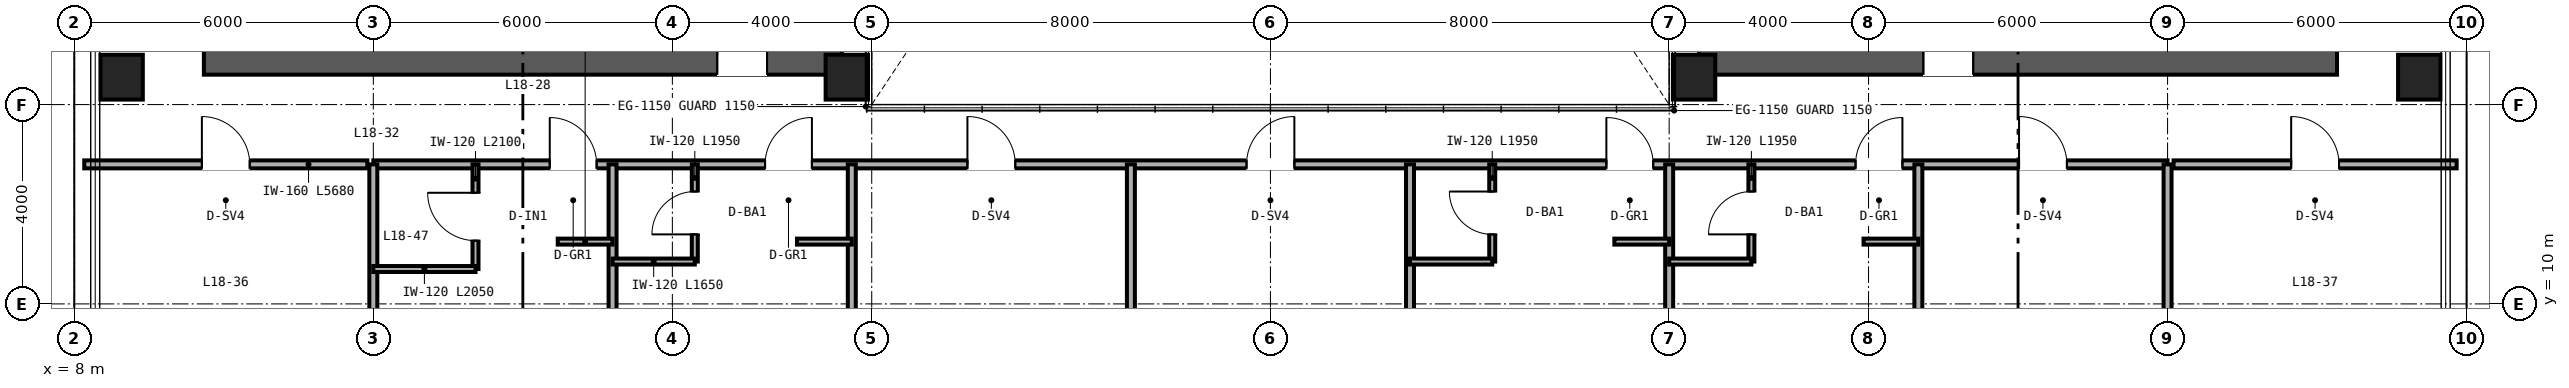
"""IFC4 building model, lengths in metres.
Left out: names, types, materials, properties, quantities, classifications, styles, units other than length and angle.
Written with IfcOpenShell. Run it as: python <this file> out.ifc"""

import sys

from ifc_helpers import new_model, si_unit, direction, frame, frame_2d, origin, origin_2d, place, context, subcontext, project, spatial, rectangle, hollow_rectangle, extrude, source, transform, mapped, element, fill, save


model = new_model("IFC4")
c1 = context("Model", 3, precision=1e-05, world=origin(), true_north=direction((0.0, 1.0)))
c2 = subcontext(c1, "Body", "Model", "MODEL_VIEW")
j1 = project(units=[si_unit("LENGTHUNIT", "METRE"), si_unit("PLANEANGLEUNIT", "RADIAN")], contexts=[c1])
p1 = place(None, origin())
s1 = spatial("IfcSite", under=j1, at=p1, CompositionType="ELEMENT")
p2 = place(p1, origin())
s2 = spatial("IfcBuilding", under=s1, at=p2, CompositionType="ELEMENT")
p3 = place(p2, frame((0.0, 0.0, 74.4)))
s3 = spatial("IfcBuildingStorey", under=s2, at=p3, CompositionType="ELEMENT", Elevation=74.4)
p4 = place(p3, frame((10.6, 15.0, 0.0), z_axis=(0.0, 0.0, 1.0), x_axis=(1.0, 0.0, 0.0)))
e1 = element("IfcWall", 1, at=p4, inside=s3, PredefinedType="SHEAR", context=c2, shape_type="SweptSolid", body=[
    extrude(rectangle(XDim=12.8, YDim=0.8, at=frame_2d((6.4, 0.0))), origin(), (0.0, 0.0, 1.0), 3.35),
])
p5 = place(p4, frame((10.3, 0.0, 0.0)))
e2 = element("IfcOpeningElement", 2, at=p5, cuts=e1, PredefinedType="OPENING", context=c2, shape_type="SweptSolid", body=[
    extrude(rectangle(XDim=1.0, YDim=2.15, at=frame_2d((0.5, 1.075))), frame((0.0, 0.41, 0.0), z_axis=(0.0, -1.0, 0.0), x_axis=(1.0, 0.0, 0.0)), (0.0, 0.0, 1.0), 0.82),
])
p6 = place(p3, frame((40.6, 15.0, 0.0), z_axis=(0.0, 0.0, 1.0), x_axis=(1.0, 0.0, 0.0)))
e3 = element("IfcWall", 3, at=p6, inside=s3, PredefinedType="SHEAR", context=c2, shape_type="SweptSolid", body=[
    extrude(rectangle(XDim=12.8, YDim=0.8, at=frame_2d((6.4, 0.0))), origin(), (0.0, 0.0, 1.0), 3.35),
])
p7 = place(p6, frame((4.5, 0.0, 0.0)))
e4 = element("IfcOpeningElement", 4, at=p7, cuts=e3, PredefinedType="OPENING", context=c2, shape_type="SweptSolid", body=[
    extrude(rectangle(XDim=1.0, YDim=2.15, at=frame_2d((0.5, 1.075))), frame((0.0, 0.41, 0.0), z_axis=(0.0, -1.0, 0.0), x_axis=(1.0, 0.0, 0.0)), (0.0, 0.0, 1.0), 0.82),
])
m1 = source(origin(), c2, "Body", "SweptSolid", [
    extrude(hollow_rectangle(XDim=0.85, YDim=0.9, WallThickness=0.04, at=origin_2d()), origin(), (0.0, 0.0, 1.0), 3.35),
])
for number, where, z_axis, x_axis in (
    (5, (8.95, 14.55, 0.0), (0.0, 0.0, 1.0), (1.0, 0.0, 0.0)),
    (6, (23.5, 14.55, 0.0), (0.0, 0.0, 1.0), (1.0, 0.0, 0.0)),
    (7, (40.5, 14.55, 0.0), (0.0, 0.0, 1.0), (1.0, 0.0, 0.0)),
    (8, (55.05, 14.55, 0.0), (0.0, 0.0, 1.0), (1.0, 0.0, 0.0)),
):
    element("IfcColumn", number, at=place(p3, frame(where, z_axis=z_axis, x_axis=x_axis)), inside=s3, PredefinedType="COLUMN", context=c2, shape_type="MappedRepresentation", body=[
        mapped(m1, transform((0.0, 0.0, 0.0), scale=1.0)),
    ])
p8 = place(p3, frame((8.2, 12.8, 0.0), z_axis=(0.0, 0.0, 1.0), x_axis=(1.0, 0.0, 0.0)))
e9 = element("IfcWall", 9, at=p8, inside=s3, PredefinedType="PARTITIONING", context=c2, shape_type="SweptSolid", body=[
    extrude(rectangle(XDim=5.68, YDim=0.16, at=frame_2d((2.84, 0.0))), origin(), (0.0, 0.0, 1.0), 3.35),
])
p9 = place(p8, frame((2.36, 0.0, 0.0)))
e10 = element("IfcOpeningElement", 10, at=p9, cuts=e9, PredefinedType="OPENING", context=c2, shape_type="SweptSolid", body=[
    extrude(rectangle(XDim=0.96, YDim=2.15, at=frame_2d((0.48, 1.075))), frame((0.0, 0.09, 0.0), z_axis=(0.0, -1.0, 0.0), x_axis=(1.0, 0.0, 0.0)), (0.0, 0.0, 1.0), 0.18),
])
p10 = place(p3, frame((50.12, 12.8, 0.0), z_axis=(0.0, 0.0, 1.0), x_axis=(1.0, 0.0, 0.0)))
e11 = element("IfcWall", 11, at=p10, inside=s3, PredefinedType="PARTITIONING", context=c2, shape_type="SweptSolid", body=[
    extrude(rectangle(XDim=5.68, YDim=0.16, at=frame_2d((2.84, 0.0))), origin(), (0.0, 0.0, 1.0), 3.35),
])
p11 = place(p10, frame((2.36, 0.0, 0.0)))
e12 = element("IfcOpeningElement", 12, at=p11, cuts=e11, PredefinedType="OPENING", context=c2, shape_type="SweptSolid", body=[
    extrude(rectangle(XDim=0.96, YDim=2.15, at=frame_2d((0.48, 1.075))), frame((0.0, 0.09, 0.0), z_axis=(0.0, -1.0, 0.0), x_axis=(1.0, 0.0, 0.0)), (0.0, 0.0, 1.0), 0.18),
])
p12 = place(p3, frame((14.0, 12.8, 0.0), z_axis=(0.0, 0.0, 1.0), x_axis=(1.0, 0.0, 0.0)))
e13 = element("IfcWall", 13, at=p12, inside=s3, PredefinedType="PARTITIONING", context=c2, shape_type="SweptSolid", body=[
    extrude(rectangle(XDim=36.0, YDim=0.16, at=frame_2d((18.0, 0.0))), origin(), (0.0, 0.0, 1.0), 2.571),
])
p13 = place(p12, frame((3.54, 0.0, 0.0)))
e14 = element("IfcOpeningElement", 14, at=p13, cuts=e13, PredefinedType="OPENING", context=c2, shape_type="SweptSolid", body=[
    extrude(rectangle(XDim=0.94, YDim=2.15, at=frame_2d((0.47, 1.075))), frame((0.0, 0.09, 0.0), z_axis=(0.0, -1.0, 0.0), x_axis=(1.0, 0.0, 0.0)), (0.0, 0.0, 1.0), 0.18),
])
p14 = place(p12, frame((7.86, 0.0, 0.0)))
e15 = element("IfcOpeningElement", 15, at=p14, cuts=e13, PredefinedType="OPENING", context=c2, shape_type="SweptSolid", body=[
    extrude(rectangle(XDim=0.94, YDim=2.15, at=frame_2d((0.47, 1.075))), frame((0.0, 0.09, 0.0), z_axis=(0.0, -1.0, 0.0), x_axis=(1.0, 0.0, 0.0)), (0.0, 0.0, 1.0), 0.18),
])
p15 = place(p12, frame((11.92, 0.0, 0.0)))
e16 = element("IfcOpeningElement", 16, at=p15, cuts=e13, PredefinedType="OPENING", context=c2, shape_type="SweptSolid", body=[
    extrude(rectangle(XDim=0.96, YDim=2.15, at=frame_2d((0.48, 1.075))), frame((0.0, 0.09, 0.0), z_axis=(0.0, -1.0, 0.0), x_axis=(1.0, 0.0, 0.0)), (0.0, 0.0, 1.0), 0.18),
])
p16 = place(p12, frame((17.52, 0.0, 0.0)))
e17 = element("IfcOpeningElement", 17, at=p16, cuts=e13, PredefinedType="OPENING", context=c2, shape_type="SweptSolid", body=[
    extrude(rectangle(XDim=0.96, YDim=2.15, at=frame_2d((0.48, 1.075))), frame((0.0, 0.09, 0.0), z_axis=(0.0, -1.0, 0.0), x_axis=(1.0, 0.0, 0.0)), (0.0, 0.0, 1.0), 0.18),
])
p17 = place(p12, frame((24.74, 0.0, 0.0)))
e18 = element("IfcOpeningElement", 18, at=p17, cuts=e13, PredefinedType="OPENING", context=c2, shape_type="SweptSolid", body=[
    extrude(rectangle(XDim=0.94, YDim=2.15, at=frame_2d((0.47, 1.075))), frame((0.0, 0.09, 0.0), z_axis=(0.0, -1.0, 0.0), x_axis=(1.0, 0.0, 0.0)), (0.0, 0.0, 1.0), 0.18),
])
p18 = place(p12, frame((29.74, 0.0, 0.0)))
e19 = element("IfcOpeningElement", 19, at=p18, cuts=e13, PredefinedType="OPENING", context=c2, shape_type="SweptSolid", body=[
    extrude(rectangle(XDim=0.94, YDim=2.15, at=frame_2d((0.47, 1.075))), frame((0.0, 0.09, 0.0), z_axis=(0.0, -1.0, 0.0), x_axis=(1.0, 0.0, 0.0)), (0.0, 0.0, 1.0), 0.18),
])
p19 = place(p12, frame((33.02, 0.0, 0.0)))
e20 = element("IfcOpeningElement", 20, at=p19, cuts=e13, PredefinedType="OPENING", context=c2, shape_type="SweptSolid", body=[
    extrude(rectangle(XDim=0.96, YDim=2.15, at=frame_2d((0.48, 1.075))), frame((0.0, 0.09, 0.0), z_axis=(0.0, -1.0, 0.0), x_axis=(1.0, 0.0, 0.0)), (0.0, 0.0, 1.0), 0.18),
])
for number, where, z_axis, x_axis in (
    (21, (14.0, 2.36, 0.0), (0.0, 0.0, 1.0), (0.0, 1.0, 0.0)),
    (22, (50.0, 2.36, 0.0), (0.0, 0.0, 1.0), (0.0, 1.0, 0.0)),
    (23, (18.8, 2.36, 0.0), (0.0, 0.0, 1.0), (0.0, 1.0, 0.0)),
):
    element("IfcWall", number, at=place(p3, frame(where, z_axis=z_axis, x_axis=x_axis)), inside=s3, PredefinedType="PARTITIONING", context=c2, shape_type="SweptSolid", body=[
        extrude(rectangle(XDim=10.44, YDim=0.16, at=frame_2d((5.22, 0.0))), origin(), (0.0, 0.0, 1.0), 2.657),
    ])
p20 = place(p3, frame((16.05, 10.7, 0.0), z_axis=(0.0, 0.0, 1.0), x_axis=(0.0, 1.0, 0.0)))
e24 = element("IfcWall", 24, at=p20, inside=s3, PredefinedType="PARTITIONING", context=c2, shape_type="SweptSolid", body=[
    extrude(rectangle(XDim=2.1, YDim=0.12, at=frame_2d((1.05, 0.0))), origin(), (0.0, 0.0, 1.0), 3.35),
])
p21 = place(p20, frame((0.57, 0.0, 0.0)))
e25 = element("IfcOpeningElement", 25, at=p21, cuts=e24, PredefinedType="OPENING", context=c2, shape_type="SweptSolid", body=[
    extrude(rectangle(XDim=0.96, YDim=2.15, at=frame_2d((0.48, 1.075))), frame((0.0, 0.07, 0.0), z_axis=(0.0, -1.0, 0.0), x_axis=(1.0, 0.0, 0.0)), (0.0, 0.0, 1.0), 0.14),
])
p22 = place(p3, frame((14.0, 10.7, 0.0), z_axis=(0.0, 0.0, 1.0), x_axis=(1.0, 0.0, 0.0)))
e26 = element("IfcWall", 26, at=p22, inside=s3, PredefinedType="PARTITIONING", context=c2, shape_type="SweptSolid", body=[
    extrude(rectangle(XDim=2.05, YDim=0.12, at=frame_2d((1.025, 0.0))), origin(), (0.0, 0.0, 1.0), 3.35),
])
p23 = place(p3, frame((17.7, 11.25, 0.0), z_axis=(0.0, 0.0, 1.0), x_axis=(1.0, 0.0, 0.0)))
e27 = element("IfcWall", 27, at=p23, inside=s3, PredefinedType="PARTITIONING", context=c2, shape_type="SweptSolid", body=[
    extrude(rectangle(XDim=1.1, YDim=0.12, at=frame_2d((0.55, 0.0))), origin(), (0.0, 0.0, 1.0), 3.35),
])
p24 = place(p3, frame((23.6, 2.36, 0.0), z_axis=(0.0, 0.0, 1.0), x_axis=(0.0, 1.0, 0.0)))
e28 = element("IfcWall", 28, at=p24, inside=s3, PredefinedType="PARTITIONING", context=c2, shape_type="SweptSolid", body=[
    extrude(rectangle(XDim=10.44, YDim=0.16, at=frame_2d((5.22, 0.0))), origin(), (0.0, 0.0, 1.0), 2.423),
])
p25 = place(p3, frame((20.45, 10.85, 0.0), z_axis=(0.0, 0.0, 1.0), x_axis=(0.0, 1.0, 0.0)))
e29 = element("IfcWall", 29, at=p25, inside=s3, PredefinedType="PARTITIONING", context=c2, shape_type="SweptSolid", body=[
    extrude(rectangle(XDim=1.95, YDim=0.12, at=frame_2d((0.975, 0.0))), origin(), (0.0, 0.0, 1.0), 3.35),
])
p26 = place(p25, frame((0.545, 0.0, 0.0)))
e30 = element("IfcOpeningElement", 30, at=p26, cuts=e29, PredefinedType="OPENING", context=c2, shape_type="SweptSolid", body=[
    extrude(rectangle(XDim=0.86, YDim=2.1, at=frame_2d((0.43, 1.05))), frame((0.0, 0.07, 0.0), z_axis=(0.0, -1.0, 0.0), x_axis=(1.0, 0.0, 0.0)), (0.0, 0.0, 1.0), 0.14),
])
p27 = place(p3, frame((18.8, 10.85, 0.0), z_axis=(0.0, 0.0, 1.0), x_axis=(1.0, 0.0, 0.0)))
e31 = element("IfcWall", 31, at=p27, inside=s3, PredefinedType="PARTITIONING", context=c2, shape_type="SweptSolid", body=[
    extrude(rectangle(XDim=1.65, YDim=0.12, at=frame_2d((0.825, 0.0))), origin(), (0.0, 0.0, 1.0), 3.35),
])
p28 = place(p3, frame((22.5, 11.25, 0.0), z_axis=(0.0, 0.0, 1.0), x_axis=(1.0, 0.0, 0.0)))
e32 = element("IfcWall", 32, at=p28, inside=s3, PredefinedType="PARTITIONING", context=c2, shape_type="SweptSolid", body=[
    extrude(rectangle(XDim=1.1, YDim=0.12, at=frame_2d((0.55, 0.0))), origin(), (0.0, 0.0, 1.0), 2.571),
])
for number, where, z_axis, x_axis in (
    (33, (29.2, 2.36, 0.0), (0.0, 0.0, 1.0), (0.0, 1.0, 0.0)),
    (34, (34.8, 2.36, 0.0), (0.0, 0.0, 1.0), (0.0, 1.0, 0.0)),
    (35, (40.0, 2.36, 0.0), (0.0, 0.0, 1.0), (0.0, 1.0, 0.0)),
):
    element("IfcWall", number, at=place(p3, frame(where, z_axis=z_axis, x_axis=x_axis)), inside=s3, PredefinedType="PARTITIONING", context=c2, shape_type="SweptSolid", body=[
        extrude(rectangle(XDim=10.44, YDim=0.16, at=frame_2d((5.22, 0.0))), origin(), (0.0, 0.0, 1.0), 2.423),
    ])
p29 = place(p3, frame((36.45, 10.85, 0.0), z_axis=(0.0, 0.0, 1.0), x_axis=(0.0, 1.0, 0.0)))
e36 = element("IfcWall", 36, at=p29, inside=s3, PredefinedType="PARTITIONING", context=c2, shape_type="SweptSolid", body=[
    extrude(rectangle(XDim=1.95, YDim=0.12, at=frame_2d((0.975, 0.0))), origin(), (0.0, 0.0, 1.0), 3.35),
])
p30 = place(p29, frame((0.545, 0.0, 0.0)))
e37 = element("IfcOpeningElement", 37, at=p30, cuts=e36, PredefinedType="OPENING", context=c2, shape_type="SweptSolid", body=[
    extrude(rectangle(XDim=0.86, YDim=2.1, at=frame_2d((0.43, 1.05))), frame((0.0, 0.07, 0.0), z_axis=(0.0, -1.0, 0.0), x_axis=(1.0, 0.0, 0.0)), (0.0, 0.0, 1.0), 0.14),
])
p31 = place(p3, frame((34.8, 10.85, 0.0), z_axis=(0.0, 0.0, 1.0), x_axis=(1.0, 0.0, 0.0)))
e38 = element("IfcWall", 38, at=p31, inside=s3, PredefinedType="PARTITIONING", context=c2, shape_type="SweptSolid", body=[
    extrude(rectangle(XDim=1.65, YDim=0.12, at=frame_2d((0.825, 0.0))), origin(), (0.0, 0.0, 1.0), 3.35),
])
p32 = place(p3, frame((38.9, 11.25, 0.0), z_axis=(0.0, 0.0, 1.0), x_axis=(1.0, 0.0, 0.0)))
e39 = element("IfcWall", 39, at=p32, inside=s3, PredefinedType="PARTITIONING", context=c2, shape_type="SweptSolid", body=[
    extrude(rectangle(XDim=1.1, YDim=0.12, at=frame_2d((0.55, 0.0))), origin(), (0.0, 0.0, 1.0), 3.35),
])
p33 = place(p3, frame((45.0, 2.36, 0.0), z_axis=(0.0, 0.0, 1.0), x_axis=(0.0, 1.0, 0.0)))
e40 = element("IfcWall", 40, at=p33, inside=s3, PredefinedType="PARTITIONING", context=c2, shape_type="SweptSolid", body=[
    extrude(rectangle(XDim=10.44, YDim=0.16, at=frame_2d((5.22, 0.0))), origin(), (0.0, 0.0, 1.0), 2.657),
])
p34 = place(p3, frame((41.65, 10.85, 0.0), z_axis=(0.0, 0.0, 1.0), x_axis=(0.0, 1.0, 0.0)))
e41 = element("IfcWall", 41, at=p34, inside=s3, PredefinedType="PARTITIONING", context=c2, shape_type="SweptSolid", body=[
    extrude(rectangle(XDim=1.95, YDim=0.12, at=frame_2d((0.975, 0.0))), origin(), (0.0, 0.0, 1.0), 3.35),
])
p35 = place(p34, frame((0.545, 0.0, 0.0)))
e42 = element("IfcOpeningElement", 42, at=p35, cuts=e41, PredefinedType="OPENING", context=c2, shape_type="SweptSolid", body=[
    extrude(rectangle(XDim=0.86, YDim=2.1, at=frame_2d((0.43, 1.05))), frame((0.0, 0.07, 0.0), z_axis=(0.0, -1.0, 0.0), x_axis=(1.0, 0.0, 0.0)), (0.0, 0.0, 1.0), 0.14),
])
p36 = place(p3, frame((40.0, 10.85, 0.0), z_axis=(0.0, 0.0, 1.0), x_axis=(1.0, 0.0, 0.0)))
e43 = element("IfcWall", 43, at=p36, inside=s3, PredefinedType="PARTITIONING", context=c2, shape_type="SweptSolid", body=[
    extrude(rectangle(XDim=1.65, YDim=0.12, at=frame_2d((0.825, 0.0))), origin(), (0.0, 0.0, 1.0), 2.571),
])
p37 = place(p3, frame((43.9, 11.25, 0.0), z_axis=(0.0, 0.0, 1.0), x_axis=(1.0, 0.0, 0.0)))
e44 = element("IfcWall", 44, at=p37, inside=s3, PredefinedType="PARTITIONING", context=c2, shape_type="SweptSolid", body=[
    extrude(rectangle(XDim=1.1, YDim=0.12, at=frame_2d((0.55, 0.0))), origin(), (0.0, 0.0, 1.0), 3.35),
])
m2 = source(origin(), c2, "Body", "SweptSolid", [
    extrude(rectangle(XDim=1.0, YDim=2.15, at=frame_2d((0.5, 1.075))), frame((0.0, 0.025, 0.0), z_axis=(0.0, -1.0, 0.0), x_axis=(1.0, 0.0, 0.0)), (0.0, 0.0, 1.0), 0.05),
])
p38 = place(p5, origin())
e45 = element("IfcDoor", 45, at=p38, inside=s3, OperationType="SINGLE_SWING_LEFT", PredefinedType="DOOR", context=c2, shape_type="MappedRepresentation", body=[
    mapped(m2, transform((0.0, 0.0, 0.0), scale=1.0)),
])
fill(e2, e45)
p39 = place(p7, origin())
e46 = element("IfcDoor", 46, at=p39, inside=s3, OperationType="SINGLE_SWING_RIGHT", PredefinedType="DOOR", context=c2, shape_type="MappedRepresentation", body=[
    mapped(m2, transform((0.0, 0.0, 0.0), scale=1.0)),
])
fill(e4, e46)
m3 = source(origin(), c2, "Body", "SweptSolid", [
    extrude(rectangle(XDim=0.96, YDim=2.15, at=frame_2d((0.48, 1.075))), frame((0.0, 0.025, 0.0), z_axis=(0.0, -1.0, 0.0), x_axis=(1.0, 0.0, 0.0)), (0.0, 0.0, 1.0), 0.05),
])
p40 = place(p9, origin())
e47 = element("IfcDoor", 47, at=p40, inside=s3, OperationType="SINGLE_SWING_LEFT", PredefinedType="DOOR", context=c2, shape_type="MappedRepresentation", body=[
    mapped(m3, transform((0.0, 0.0, 0.0), scale=1.0)),
])
fill(e10, e47)
p41 = place(p11, origin())
e48 = element("IfcDoor", 48, at=p41, inside=s3, OperationType="SINGLE_SWING_LEFT", PredefinedType="DOOR", context=c2, shape_type="MappedRepresentation", body=[
    mapped(m3, transform((0.0, 0.0, 0.0), scale=1.0)),
])
fill(e12, e48)
p42 = place(p21, origin())
e49 = element("IfcDoor", 49, at=p42, inside=s3, OperationType="SINGLE_SWING_RIGHT", PredefinedType="DOOR", context=c2, shape_type="MappedRepresentation", body=[
    mapped(m3, transform((0.0, 0.0, 0.0), scale=1.0)),
])
fill(e25, e49)
m4 = source(origin(), c2, "Body", "SweptSolid", [
    extrude(rectangle(XDim=0.86, YDim=2.1, at=frame_2d((0.43, 1.05))), frame((0.0, 0.025, 0.0), z_axis=(0.0, -1.0, 0.0), x_axis=(1.0, 0.0, 0.0)), (0.0, 0.0, 1.0), 0.05),
])
p43 = place(p26, origin())
e50 = element("IfcDoor", 50, at=p43, inside=s3, OperationType="SINGLE_SWING_LEFT", PredefinedType="DOOR", context=c2, shape_type="MappedRepresentation", body=[
    mapped(m4, transform((0.0, 0.0, 0.0), scale=1.0)),
])
fill(e30, e50)
p44 = place(p30, origin())
e51 = element("IfcDoor", 51, at=p44, inside=s3, OperationType="SINGLE_SWING_RIGHT", PredefinedType="DOOR", context=c2, shape_type="MappedRepresentation", body=[
    mapped(m4, transform((0.0, 0.0, 0.0), scale=1.0)),
])
fill(e37, e51)
p45 = place(p35, origin())
e52 = element("IfcDoor", 52, at=p45, inside=s3, OperationType="SINGLE_SWING_LEFT", PredefinedType="DOOR", context=c2, shape_type="MappedRepresentation", body=[
    mapped(m4, transform((0.0, 0.0, 0.0), scale=1.0)),
])
fill(e42, e52)
m5 = source(origin(), c2, "Body", "SweptSolid", [
    extrude(rectangle(XDim=0.94, YDim=2.15, at=frame_2d((0.47, 1.075))), frame((0.0, 0.025, 0.0), z_axis=(0.0, -1.0, 0.0), x_axis=(1.0, 0.0, 0.0)), (0.0, 0.0, 1.0), 0.05),
])
p46 = place(p13, origin())
e53 = element("IfcDoor", 53, at=p46, inside=s3, OperationType="SINGLE_SWING_LEFT", PredefinedType="DOOR", context=c2, shape_type="MappedRepresentation", body=[
    mapped(m5, transform((0.0, 0.0, 0.0), scale=1.0)),
])
fill(e14, e53)
p47 = place(p14, origin())
e54 = element("IfcDoor", 54, at=p47, inside=s3, OperationType="SINGLE_SWING_RIGHT", PredefinedType="DOOR", context=c2, shape_type="MappedRepresentation", body=[
    mapped(m5, transform((0.0, 0.0, 0.0), scale=1.0)),
])
fill(e15, e54)
p48 = place(p15, origin())
e55 = element("IfcDoor", 55, at=p48, inside=s3, OperationType="SINGLE_SWING_LEFT", PredefinedType="DOOR", context=c2, shape_type="MappedRepresentation", body=[
    mapped(m3, transform((0.0, 0.0, 0.0), scale=1.0)),
])
fill(e16, e55)
p49 = place(p16, origin())
e56 = element("IfcDoor", 56, at=p49, inside=s3, OperationType="SINGLE_SWING_RIGHT", PredefinedType="DOOR", context=c2, shape_type="MappedRepresentation", body=[
    mapped(m3, transform((0.0, 0.0, 0.0), scale=1.0)),
])
fill(e17, e56)
p50 = place(p17, origin())
e57 = element("IfcDoor", 57, at=p50, inside=s3, OperationType="SINGLE_SWING_LEFT", PredefinedType="DOOR", context=c2, shape_type="MappedRepresentation", body=[
    mapped(m5, transform((0.0, 0.0, 0.0), scale=1.0)),
])
fill(e18, e57)
p51 = place(p18, origin())
e58 = element("IfcDoor", 58, at=p51, inside=s3, OperationType="SINGLE_SWING_RIGHT", PredefinedType="DOOR", context=c2, shape_type="MappedRepresentation", body=[
    mapped(m5, transform((0.0, 0.0, 0.0), scale=1.0)),
])
fill(e19, e58)
p52 = place(p19, origin())
e59 = element("IfcDoor", 59, at=p52, inside=s3, OperationType="SINGLE_SWING_LEFT", PredefinedType="DOOR", context=c2, shape_type="MappedRepresentation", body=[
    mapped(m3, transform((0.0, 0.0, 0.0), scale=1.0)),
])
fill(e20, e59)
save(model, sys.argv[1])
